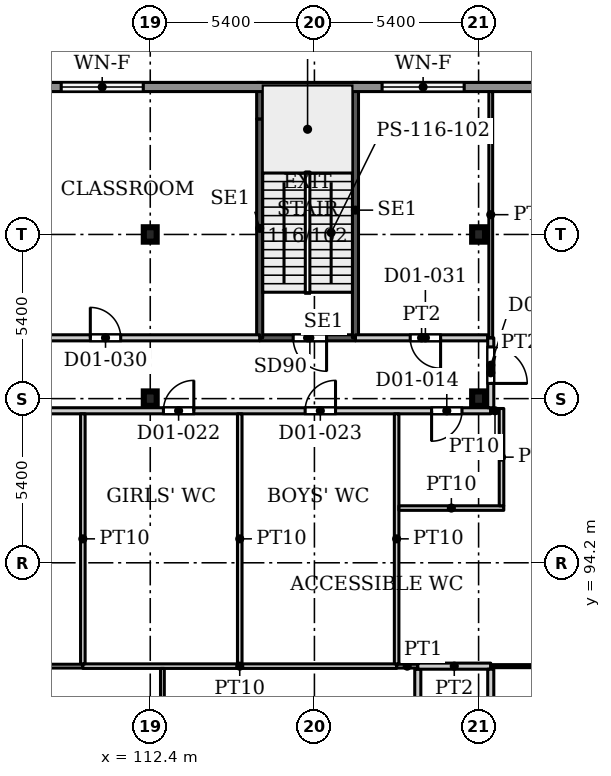
"""IFC4 building model, lengths in metres.
Left out: names, types, materials, properties, quantities, classifications, styles, units other than length and angle.
Written with IfcOpenShell. Run it as: python <this file> out.ifc"""

import sys

from ifc_helpers import new_model, si_unit, direction, frame, frame_2d, origin, origin_2d, place, context, subcontext, project, spatial, rectangle, i_section, extrude, source, transform, mapped, element, fill, save


model = new_model("IFC4")
c1 = context("Model", 3, precision=1e-05, world=origin(), true_north=direction((0.0, 1.0)))
c2 = subcontext(c1, "Body", "Model", "MODEL_VIEW")
j1 = project(units=[si_unit("LENGTHUNIT", "METRE"), si_unit("PLANEANGLEUNIT", "RADIAN")], contexts=[c1])
p1 = place(None, origin())
s1 = spatial("IfcSite", under=j1, at=p1, CompositionType="ELEMENT")
p2 = place(p1, origin())
s2 = spatial("IfcBuilding", under=s1, at=p2, CompositionType="ELEMENT")
p3 = place(p2, frame((0.0, 0.0, 7.5)))
s3 = spatial("IfcBuildingStorey", under=s2, at=p3, CompositionType="ELEMENT", Elevation=7.5)
for number, where, z_axis, x_axis in (
    (1, (112.4, 99.6, 0.0), (0.0, 0.0, 1.0), (1.0, 0.0, 0.0)),
    (2, (123.2, 99.6, 0.0), (0.0, 0.0, 1.0), (1.0, 0.0, 0.0)),
    (3, (112.4, 105.0, 0.0), (0.0, 0.0, 1.0), (1.0, 0.0, 0.0)),
    (4, (123.2, 105.0, 0.0), (0.0, 0.0, 1.0), (1.0, 0.0, 0.0)),
):
    element("IfcColumn", number, at=place(p3, frame(where, z_axis=z_axis, x_axis=x_axis)), inside=s3, PredefinedType="COLUMN", context=c2, shape_type="SweptSolid", body=[
        extrude(i_section(OverallWidth=0.424, OverallDepth=0.474, WebThickness=0.048, FlangeThickness=0.077, FilletRadius=0.014, at=origin_2d()), origin(), (0.0, 0.0, 1.0), 5.0),
    ])
p4 = place(p3, frame((78.48, 109.85, 0.0), z_axis=(0.0, 0.0, 1.0), x_axis=(1.0, 0.0, 0.0)))
e5 = element("IfcWall", 5, at=p4, inside=s3, PredefinedType="SOLIDWALL", context=c2, shape_type="SweptSolid", body=[
    extrude(rectangle(XDim=47.52, YDim=0.3, at=frame_2d((23.76, 0.0))), origin(), (0.0, 0.0, 1.0), 4.75),
])
p5 = place(p4, frame((1.045, 0.0, 0.6)))
e6 = element("IfcOpeningElement", 6, at=p5, cuts=e5, PredefinedType="OPENING", context=c2, shape_type="SweptSolid", body=[
    extrude(rectangle(XDim=2.7, YDim=3.0, at=frame_2d((1.35, 1.5))), frame((0.0, 0.16, 0.0), z_axis=(0.0, -1.0, 0.0), x_axis=(1.0, 0.0, 0.0)), (0.0, 0.0, 1.0), 0.32),
])
p6 = place(p4, frame((6.28, 0.0, 0.6)))
e7 = element("IfcOpeningElement", 7, at=p6, cuts=e5, PredefinedType="OPENING", context=c2, shape_type="SweptSolid", body=[
    extrude(rectangle(XDim=2.7, YDim=3.0, at=frame_2d((1.35, 1.5))), frame((0.0, 0.16, 0.0), z_axis=(0.0, -1.0, 0.0), x_axis=(1.0, 0.0, 0.0)), (0.0, 0.0, 1.0), 0.32),
])
p7 = place(p4, frame((15.765, 0.0, 0.6)))
e8 = element("IfcOpeningElement", 8, at=p7, cuts=e5, PredefinedType="OPENING", context=c2, shape_type="SweptSolid", body=[
    extrude(rectangle(XDim=2.7, YDim=3.0, at=frame_2d((1.35, 1.5))), frame((0.0, 0.16, 0.0), z_axis=(0.0, -1.0, 0.0), x_axis=(1.0, 0.0, 0.0)), (0.0, 0.0, 1.0), 0.32),
])
p8 = place(p4, frame((22.47, 0.0, 0.6)))
e9 = element("IfcOpeningElement", 9, at=p8, cuts=e5, PredefinedType="OPENING", context=c2, shape_type="SweptSolid", body=[
    extrude(rectangle(XDim=2.7, YDim=3.0, at=frame_2d((1.35, 1.5))), frame((0.0, 0.16, 0.0), z_axis=(0.0, -1.0, 0.0), x_axis=(1.0, 0.0, 0.0)), (0.0, 0.0, 1.0), 0.32),
])
p9 = place(p4, frame((30.99, 0.0, 0.6)))
e10 = element("IfcOpeningElement", 10, at=p9, cuts=e5, PredefinedType="OPENING", context=c2, shape_type="SweptSolid", body=[
    extrude(rectangle(XDim=2.7, YDim=3.0, at=frame_2d((1.35, 1.5))), frame((0.0, 0.16, 0.0), z_axis=(0.0, -1.0, 0.0), x_axis=(1.0, 0.0, 0.0)), (0.0, 0.0, 1.0), 0.32),
])
p10 = place(p4, frame((41.545, 0.0, 0.6)))
e11 = element("IfcOpeningElement", 11, at=p10, cuts=e5, PredefinedType="OPENING", context=c2, shape_type="SweptSolid", body=[
    extrude(rectangle(XDim=2.7, YDim=3.0, at=frame_2d((1.35, 1.5))), frame((0.0, 0.16, 0.0), z_axis=(0.0, -1.0, 0.0), x_axis=(1.0, 0.0, 0.0)), (0.0, 0.0, 1.0), 0.32),
])
p11 = place(p3, frame((116.0, 101.6, 0.0), z_axis=(0.0, 0.0, 1.0), x_axis=(1.0, 0.0, 0.0)))
e12 = element("IfcWall", 12, at=p11, inside=s3, PredefinedType="SHEAR", context=c2, shape_type="SweptSolid", body=[
    extrude(rectangle(XDim=3.15, YDim=0.2, at=frame_2d((1.575, 0.0))), origin(), (0.0, 0.0, 1.0), 5.0),
])
p12 = place(p11, frame((1.1, 0.0, 0.0)))
e13 = element("IfcOpeningElement", 13, at=p12, cuts=e12, PredefinedType="OPENING", context=c2, shape_type="SweptSolid", body=[
    extrude(rectangle(XDim=1.1, YDim=2.2, at=frame_2d((0.55, 1.1))), frame((0.0, 0.11, 0.0), z_axis=(0.0, -1.0, 0.0), x_axis=(1.0, 0.0, 0.0)), (0.0, 0.0, 1.0), 0.22),
])
p13 = place(p3, frame((116.0, 101.6, 0.0), z_axis=(0.0, 0.0, 1.0), x_axis=(0.0, 1.0, 0.0)))
e14 = element("IfcWall", 14, at=p13, inside=s3, PredefinedType="SHEAR", context=c2, shape_type="SweptSolid", body=[
    extrude(rectangle(XDim=7.2, YDim=0.2, at=frame_2d((3.6, 0.0))), origin(), (0.0, 0.0, 1.0), 5.0),
])
p14 = place(p3, frame((116.0, 108.8, 0.0), z_axis=(0.0, 0.0, 1.0), x_axis=(0.0, 1.0, 0.0)))
e15 = element("IfcWall", 15, at=p14, inside=s3, PredefinedType="SHEAR", context=c2, shape_type="SweptSolid", body=[
    extrude(rectangle(XDim=1.2, YDim=0.2, at=frame_2d((0.6, 0.0))), origin(), (0.0, 0.0, 1.0), 5.0),
])
p15 = place(p3, frame((119.15, 101.6, 0.0), z_axis=(0.0, 0.0, 1.0), x_axis=(0.0, 1.0, 0.0)))
e16 = element("IfcWall", 16, at=p15, inside=s3, PredefinedType="SHEAR", context=c2, shape_type="SweptSolid", body=[
    extrude(rectangle(XDim=8.4, YDim=0.2, at=frame_2d((4.2, 0.0))), origin(), (0.0, 0.0, 1.0), 5.0),
])
p16 = place(p3, frame((56.1, 99.2, 0.0), z_axis=(0.0, 0.0, 1.0), x_axis=(1.0, 0.0, 0.0)))
e17 = element("IfcWall", 17, at=p16, inside=s3, PredefinedType="PARTITIONING", context=c2, shape_type="SweptSolid", body=[
    extrude(rectangle(XDim=67.5, YDim=0.2, at=frame_2d((33.75, 0.0))), origin(), (0.0, 0.0, 1.0), 4.68),
])
p17 = place(p16, frame((4.05, 0.0, 0.0)))
e18 = element("IfcOpeningElement", 18, at=p17, cuts=e17, PredefinedType="OPENING", context=c2, shape_type="SweptSolid", body=[
    extrude(rectangle(XDim=1.0, YDim=2.1, at=frame_2d((0.5, 1.05))), frame((0.0, 0.11, 0.0), z_axis=(0.0, -1.0, 0.0), x_axis=(1.0, 0.0, 0.0)), (0.0, 0.0, 1.0), 0.22),
])
p18 = place(p16, frame((65.554, 0.0, 0.0)))
e19 = element("IfcOpeningElement", 19, at=p18, cuts=e17, PredefinedType="OPENING", context=c2, shape_type="SweptSolid", body=[
    extrude(rectangle(XDim=1.0, YDim=2.1, at=frame_2d((0.5, 1.05))), frame((0.0, 0.11, 0.0), z_axis=(0.0, -1.0, 0.0), x_axis=(1.0, 0.0, 0.0)), (0.0, 0.0, 1.0), 0.22),
])
p19 = place(p16, frame((11.589, 0.0, 0.0)))
e20 = element("IfcOpeningElement", 20, at=p19, cuts=e17, PredefinedType="OPENING", context=c2, shape_type="SweptSolid", body=[
    extrude(rectangle(XDim=1.0, YDim=2.1, at=frame_2d((0.5, 1.05))), frame((0.0, 0.11, 0.0), z_axis=(0.0, -1.0, 0.0), x_axis=(1.0, 0.0, 0.0)), (0.0, 0.0, 1.0), 0.22),
])
p20 = place(p16, frame((20.329, 0.0, 0.0)))
e21 = element("IfcOpeningElement", 21, at=p20, cuts=e17, PredefinedType="OPENING", context=c2, shape_type="SweptSolid", body=[
    extrude(rectangle(XDim=1.0, YDim=2.1, at=frame_2d((0.5, 1.05))), frame((0.0, 0.11, 0.0), z_axis=(0.0, -1.0, 0.0), x_axis=(1.0, 0.0, 0.0)), (0.0, 0.0, 1.0), 0.22),
])
p21 = place(p16, frame((27.319, 0.0, 0.0)))
e22 = element("IfcOpeningElement", 22, at=p21, cuts=e17, PredefinedType="OPENING", context=c2, shape_type="SweptSolid", body=[
    extrude(rectangle(XDim=1.0, YDim=2.1, at=frame_2d((0.5, 1.05))), frame((0.0, 0.11, 0.0), z_axis=(0.0, -1.0, 0.0), x_axis=(1.0, 0.0, 0.0)), (0.0, 0.0, 1.0), 0.22),
])
p22 = place(p16, frame((33.262, 0.0, 0.0)))
e23 = element("IfcOpeningElement", 23, at=p22, cuts=e17, PredefinedType="OPENING", context=c2, shape_type="SweptSolid", body=[
    extrude(rectangle(XDim=1.0, YDim=2.1, at=frame_2d((0.5, 1.05))), frame((0.0, 0.11, 0.0), z_axis=(0.0, -1.0, 0.0), x_axis=(1.0, 0.0, 0.0)), (0.0, 0.0, 1.0), 0.22),
])
p23 = place(p16, frame((42.002, 0.0, 0.0)))
e24 = element("IfcOpeningElement", 24, at=p23, cuts=e17, PredefinedType="OPENING", context=c2, shape_type="SweptSolid", body=[
    extrude(rectangle(XDim=1.0, YDim=2.1, at=frame_2d((0.5, 1.05))), frame((0.0, 0.11, 0.0), z_axis=(0.0, -1.0, 0.0), x_axis=(1.0, 0.0, 0.0)), (0.0, 0.0, 1.0), 0.22),
])
p24 = place(p16, frame((49.743, 0.0, 0.0)))
e25 = element("IfcOpeningElement", 25, at=p24, cuts=e17, PredefinedType="OPENING", context=c2, shape_type="SweptSolid", body=[
    extrude(rectangle(XDim=1.0, YDim=2.1, at=frame_2d((0.5, 1.05))), frame((0.0, 0.11, 0.0), z_axis=(0.0, -1.0, 0.0), x_axis=(1.0, 0.0, 0.0)), (0.0, 0.0, 1.0), 0.22),
])
p25 = place(p16, frame((56.733, 0.0, 0.0)))
e26 = element("IfcOpeningElement", 26, at=p25, cuts=e17, PredefinedType="OPENING", context=c2, shape_type="SweptSolid", body=[
    extrude(rectangle(XDim=1.0, YDim=2.1, at=frame_2d((0.5, 1.05))), frame((0.0, 0.11, 0.0), z_axis=(0.0, -1.0, 0.0), x_axis=(1.0, 0.0, 0.0)), (0.0, 0.0, 1.0), 0.22),
])
p26 = place(p16, frame((61.394, 0.0, 0.0)))
e27 = element("IfcOpeningElement", 27, at=p26, cuts=e17, PredefinedType="OPENING", context=c2, shape_type="SweptSolid", body=[
    extrude(rectangle(XDim=1.0, YDim=2.1, at=frame_2d((0.5, 1.05))), frame((0.0, 0.11, 0.0), z_axis=(0.0, -1.0, 0.0), x_axis=(1.0, 0.0, 0.0)), (0.0, 0.0, 1.0), 0.22),
])
p27 = place(p3, frame((82.0, 90.8, 0.0), z_axis=(0.0, 0.0, 1.0), x_axis=(1.0, 0.0, 0.0)))
e28 = element("IfcWall", 28, at=p27, inside=s3, PredefinedType="PARTITIONING", context=c2, shape_type="SweptSolid", body=[
    extrude(rectangle(XDim=28.183, YDim=0.125, at=frame_2d((14.092, 0.0))), origin(), (0.0, 0.0, 1.0), 4.68),
])
p28 = place(p3, frame((93.15, 101.6, 0.0), z_axis=(0.0, 0.0, 1.0), x_axis=(1.0, 0.0, 0.0)))
e29 = element("IfcWall", 29, at=p28, inside=s3, PredefinedType="PARTITIONING", context=c2, shape_type="SweptSolid", body=[
    extrude(rectangle(XDim=22.85, YDim=0.2, at=frame_2d((11.425, 0.0))), origin(), (0.0, 0.0, 1.0), 4.68),
])
p29 = place(p28, frame((1.987, 0.0, 0.0)))
e30 = element("IfcOpeningElement", 30, at=p29, cuts=e29, PredefinedType="OPENING", context=c2, shape_type="SweptSolid", body=[
    extrude(rectangle(XDim=1.0, YDim=2.1, at=frame_2d((0.5, 1.05))), frame((0.0, 0.11, 0.0), z_axis=(0.0, -1.0, 0.0), x_axis=(1.0, 0.0, 0.0)), (0.0, 0.0, 1.0), 0.22),
])
p30 = place(p28, frame((8.758, 0.0, 0.0)))
e31 = element("IfcOpeningElement", 31, at=p30, cuts=e29, PredefinedType="OPENING", context=c2, shape_type="SweptSolid", body=[
    extrude(rectangle(XDim=1.0, YDim=2.1, at=frame_2d((0.5, 1.05))), frame((0.0, 0.11, 0.0), z_axis=(0.0, -1.0, 0.0), x_axis=(1.0, 0.0, 0.0)), (0.0, 0.0, 1.0), 0.22),
])
p31 = place(p28, frame((17.279, 0.0, 0.0)))
e32 = element("IfcOpeningElement", 32, at=p31, cuts=e29, PredefinedType="OPENING", context=c2, shape_type="SweptSolid", body=[
    extrude(rectangle(XDim=1.0, YDim=2.1, at=frame_2d((0.5, 1.05))), frame((0.0, 0.11, 0.0), z_axis=(0.0, -1.0, 0.0), x_axis=(1.0, 0.0, 0.0)), (0.0, 0.0, 1.0), 0.22),
])
p32 = place(p3, frame((110.183, 90.8, 0.0), z_axis=(0.0, 0.0, 1.0), x_axis=(1.0, 0.0, 0.0)))
e33 = element("IfcWall", 33, at=p32, inside=s3, PredefinedType="PARTITIONING", context=c2, shape_type="SweptSolid", body=[
    extrude(rectangle(XDim=10.321, YDim=0.15, at=frame_2d((5.16, 0.0))), origin(), (0.0, 0.0, 1.0), 4.68),
])
p33 = place(p3, frame((110.183, 90.875, 0.0), z_axis=(0.0, 0.0, 1.0), x_axis=(0.0, 1.0, 0.0)))
e34 = element("IfcWall", 34, at=p33, inside=s3, PredefinedType="PARTITIONING", context=c2, shape_type="SweptSolid", body=[
    extrude(rectangle(XDim=8.225, YDim=0.15, at=frame_2d((4.113, 0.0))), origin(), (0.0, 0.0, 1.0), 4.68),
])
p34 = place(p3, frame((112.8, 43.938, 0.0), z_axis=(0.0, 0.0, 1.0), x_axis=(0.0, 1.0, 0.0)))
e35 = element("IfcWall", 35, at=p34, inside=s3, PredefinedType="PARTITIONING", context=c2, shape_type="SweptSolid", body=[
    extrude(rectangle(XDim=46.787, YDim=0.125, at=frame_2d((23.394, 0.0))), origin(), (0.0, 0.0, 1.0), 4.68),
])
p35 = place(p3, frame((115.344, 90.875, 0.0), z_axis=(0.0, 0.0, 1.0), x_axis=(0.0, 1.0, 0.0)))
e36 = element("IfcWall", 36, at=p35, inside=s3, PredefinedType="PARTITIONING", context=c2, shape_type="SweptSolid", body=[
    extrude(rectangle(XDim=8.225, YDim=0.15, at=frame_2d((4.113, 0.0))), origin(), (0.0, 0.0, 1.0), 4.68),
])
p36 = place(p3, frame((119.15, 101.6, 0.0), z_axis=(0.0, 0.0, 1.0), x_axis=(1.0, 0.0, 0.0)))
e37 = element("IfcWall", 37, at=p36, inside=s3, PredefinedType="PARTITIONING", context=c2, shape_type="SweptSolid", body=[
    extrude(rectangle(XDim=4.35, YDim=0.2, at=frame_2d((2.175, 0.0))), origin(), (0.0, 0.0, 1.0), 4.68),
])
p37 = place(p36, frame((1.8, 0.0, 0.0)))
e38 = element("IfcOpeningElement", 38, at=p37, cuts=e37, PredefinedType="OPENING", context=c2, shape_type="SweptSolid", body=[
    extrude(rectangle(XDim=1.0, YDim=2.1, at=frame_2d((0.5, 1.05))), frame((0.0, 0.11, 0.0), z_axis=(0.0, -1.0, 0.0), x_axis=(1.0, 0.0, 0.0)), (0.0, 0.0, 1.0), 0.22),
])
p38 = place(p3, frame((120.504, 90.8, 0.0), z_axis=(0.0, 0.0, 1.0), x_axis=(1.0, 0.0, 0.0)))
e39 = element("IfcWall", 39, at=p38, inside=s3, PredefinedType="PARTITIONING", context=c2, shape_type="SweptSolid", body=[
    extrude(rectangle(XDim=0.696, YDim=0.125, at=frame_2d((0.348, 0.0))), origin(), (0.0, 0.0, 1.0), 4.68),
])
p39 = place(p3, frame((120.504, 90.875, 0.0), z_axis=(0.0, 0.0, 1.0), x_axis=(0.0, 1.0, 0.0)))
e40 = element("IfcWall", 40, at=p39, inside=s3, PredefinedType="PARTITIONING", context=c2, shape_type="SweptSolid", body=[
    extrude(rectangle(XDim=8.225, YDim=0.15, at=frame_2d((4.113, 0.0))), origin(), (0.0, 0.0, 1.0), 4.68),
])
p40 = place(p3, frame((120.579, 96.0, 0.0), z_axis=(0.0, 0.0, 1.0), x_axis=(1.0, 0.0, 0.0)))
e41 = element("IfcWall", 41, at=p40, inside=s3, PredefinedType="PARTITIONING", context=c2, shape_type="SweptSolid", body=[
    extrude(rectangle(XDim=3.45, YDim=0.15, at=frame_2d((1.725, 0.0))), origin(), (0.0, 0.0, 1.0), 4.68),
])
p41 = place(p3, frame((121.2, 74.6, 0.0), z_axis=(0.0, 0.0, 1.0), x_axis=(0.0, 1.0, 0.0)))
e42 = element("IfcWall", 42, at=p41, inside=s3, PredefinedType="PARTITIONING", context=c2, shape_type="SweptSolid", body=[
    extrude(rectangle(XDim=16.1, YDim=0.2, at=frame_2d((8.05, 0.0))), origin(), (0.0, 0.0, 1.0), 4.68),
])
p42 = place(p41, frame((3.987, 0.0, 0.0)))
e43 = element("IfcOpeningElement", 43, at=p42, cuts=e42, PredefinedType="OPENING", context=c2, shape_type="SweptSolid", body=[
    extrude(rectangle(XDim=1.0, YDim=2.1, at=frame_2d((0.5, 1.05))), frame((0.0, 0.11, 0.0), z_axis=(0.0, -1.0, 0.0), x_axis=(1.0, 0.0, 0.0)), (0.0, 0.0, 1.0), 0.22),
])
p43 = place(p41, frame((12.05, 0.0, 0.0)))
e44 = element("IfcOpeningElement", 44, at=p43, cuts=e42, PredefinedType="OPENING", context=c2, shape_type="SweptSolid", body=[
    extrude(rectangle(XDim=1.0, YDim=2.1, at=frame_2d((0.5, 1.05))), frame((0.0, 0.11, 0.0), z_axis=(0.0, -1.0, 0.0), x_axis=(1.0, 0.0, 0.0)), (0.0, 0.0, 1.0), 0.22),
])
p44 = place(p3, frame((121.2, 90.8, 0.0), z_axis=(0.0, 0.0, 1.0), x_axis=(1.0, 0.0, 0.0)))
e45 = element("IfcWall", 45, at=p44, inside=s3, PredefinedType="PARTITIONING", context=c2, shape_type="SweptSolid", body=[
    extrude(rectangle(XDim=2.4, YDim=0.2, at=frame_2d((1.2, 0.0))), origin(), (0.0, 0.0, 1.0), 4.68),
])
p45 = place(p3, frame((123.6, 69.15, 0.0), z_axis=(0.0, 0.0, 1.0), x_axis=(0.0, 1.0, 0.0)))
e46 = element("IfcWall", 46, at=p45, inside=s3, PredefinedType="PARTITIONING", context=c2, shape_type="SweptSolid", body=[
    extrude(rectangle(XDim=21.55, YDim=0.2, at=frame_2d((10.775, 0.0))), origin(), (0.0, 0.0, 1.0), 4.68),
])
p46 = place(p45, frame((4.4, 0.0, 0.0)))
e47 = element("IfcOpeningElement", 47, at=p46, cuts=e46, PredefinedType="OPENING", context=c2, shape_type="SweptSolid", body=[
    extrude(rectangle(XDim=1.0, YDim=2.1, at=frame_2d((0.5, 1.05))), frame((0.0, 0.11, 0.0), z_axis=(0.0, -1.0, 0.0), x_axis=(1.0, 0.0, 0.0)), (0.0, 0.0, 1.0), 0.22),
])
p47 = place(p45, frame((15.238, 0.0, 0.0)))
e48 = element("IfcOpeningElement", 48, at=p47, cuts=e46, PredefinedType="OPENING", context=c2, shape_type="SweptSolid", body=[
    extrude(rectangle(XDim=1.0, YDim=2.1, at=frame_2d((0.5, 1.05))), frame((0.0, 0.11, 0.0), z_axis=(0.0, -1.0, 0.0), x_axis=(1.0, 0.0, 0.0)), (0.0, 0.0, 1.0), 0.22),
])
p48 = place(p45, frame((11.238, 0.0, 0.0)))
e49 = element("IfcOpeningElement", 49, at=p48, cuts=e46, PredefinedType="OPENING", context=c2, shape_type="SweptSolid", body=[
    extrude(rectangle(XDim=1.2, YDim=2.1, at=frame_2d((0.6, 1.05))), frame((0.0, 0.11, 0.0), z_axis=(0.0, -1.0, 0.0), x_axis=(1.0, 0.0, 0.0)), (0.0, 0.0, 1.0), 0.22),
])
p49 = place(p3, frame((123.6, 90.8, 0.0), z_axis=(0.0, 0.0, 1.0), x_axis=(1.0, 0.0, 0.0)))
e50 = element("IfcWall", 50, at=p49, inside=s3, PredefinedType="PARTITIONING", context=c2, shape_type="SweptSolid", body=[
    extrude(rectangle(XDim=8.4, YDim=0.1, at=frame_2d((4.2, 0.0))), origin(), (0.0, 0.0, 1.0), 4.68),
])
p50 = place(p3, frame((123.6, 99.2, 0.0), z_axis=(0.0, 0.0, 1.0), x_axis=(1.0, 0.0, 0.0)))
e51 = element("IfcWall", 51, at=p50, inside=s3, PredefinedType="PARTITIONING", context=c2, shape_type="SweptSolid", body=[
    extrude(rectangle(XDim=0.279, YDim=0.15, at=frame_2d((0.139, 0.0))), origin(), (0.0, 0.0, 1.0), 4.68),
])
p51 = place(p3, frame((123.6, 99.3, 0.0), z_axis=(0.0, 0.0, 1.0), x_axis=(0.0, 1.0, 0.0)))
e52 = element("IfcWall", 52, at=p51, inside=s3, PredefinedType="PARTITIONING", context=c2, shape_type="SweptSolid", body=[
    extrude(rectangle(XDim=2.3, YDim=0.2, at=frame_2d((1.15, 0.0))), origin(), (0.0, 0.0, 1.0), 4.68),
])
p52 = place(p51, frame((0.8, 0.0, 0.0)))
e53 = element("IfcOpeningElement", 53, at=p52, cuts=e52, PredefinedType="OPENING", context=c2, shape_type="SweptSolid", body=[
    extrude(rectangle(XDim=1.2, YDim=2.1, at=frame_2d((0.6, 1.05))), frame((0.0, 0.11, 0.0), z_axis=(0.0, -1.0, 0.0), x_axis=(1.0, 0.0, 0.0)), (0.0, 0.0, 1.0), 0.22),
])
p53 = place(p3, frame((123.6, 101.6, 0.0), z_axis=(0.0, 0.0, 1.0), x_axis=(0.0, 1.0, 0.0)))
e54 = element("IfcWall", 54, at=p53, inside=s3, PredefinedType="PARTITIONING", context=c2, shape_type="SweptSolid", body=[
    extrude(rectangle(XDim=8.101, YDim=0.125, at=frame_2d((4.05, 0.0))), origin(), (0.0, 0.0, 1.0), 4.68),
])
p54 = place(p3, frame((123.954, 96.075, 0.0), z_axis=(0.0, 0.0, 1.0), x_axis=(0.0, 1.0, 0.0)))
e55 = element("IfcWall", 55, at=p54, inside=s3, PredefinedType="PARTITIONING", context=c2, shape_type="SweptSolid", body=[
    extrude(rectangle(XDim=3.2, YDim=0.15, at=frame_2d((1.6, 0.0))), origin(), (0.0, 0.0, 1.0), 4.68),
])
m1 = source(origin(), c2, "Body", "SweptSolid", [
    extrude(rectangle(XDim=2.7, YDim=3.0, at=frame_2d((1.35, 1.5))), frame((0.0, 0.03, 0.0), z_axis=(0.0, -1.0, 0.0), x_axis=(1.0, 0.0, 0.0)), (0.0, 0.0, 1.0), 0.06),
])
p55 = place(p9, origin())
e56 = element("IfcWindow", 56, at=p55, inside=s3, PartitioningType="SINGLE_PANEL", PredefinedType="WINDOW", context=c2, shape_type="MappedRepresentation", body=[
    mapped(m1, transform((0.0, 0.0, 0.0), x_axis=(1.0, 0.0, 0.0), y_axis=(0.0, 1.0, 0.0), z_axis=(0.0, 0.0, 1.0), scale=1.0)),
])
fill(e10, e56)
p56 = place(p10, origin())
e57 = element("IfcWindow", 57, at=p56, inside=s3, PartitioningType="SINGLE_PANEL", PredefinedType="WINDOW", context=c2, shape_type="MappedRepresentation", body=[
    mapped(m1, transform((0.0, 0.0, 0.0), x_axis=(1.0, 0.0, 0.0), y_axis=(0.0, 1.0, 0.0), z_axis=(0.0, 0.0, 1.0), scale=1.0)),
])
fill(e11, e57)
m2 = source(origin(), c2, "Body", "SweptSolid", [
    extrude(rectangle(XDim=1.1, YDim=2.2, at=frame_2d((0.55, 1.1))), frame((0.0, 0.025, 0.0), z_axis=(0.0, -1.0, 0.0), x_axis=(1.0, 0.0, 0.0)), (0.0, 0.0, 1.0), 0.05),
])
p57 = place(p12, origin())
e58 = element("IfcDoor", 58, at=p57, inside=s3, OperationType="SINGLE_SWING_RIGHT", PredefinedType="DOOR", context=c2, shape_type="MappedRepresentation", body=[
    mapped(m2, transform((0.0, 0.0, 0.0), x_axis=(1.0, 0.0, 0.0), y_axis=(0.0, 1.0, 0.0), z_axis=(0.0, 0.0, 1.0), scale=1.0)),
])
fill(e13, e58)
m3 = source(origin(), c2, "Body", "SweptSolid", [
    extrude(rectangle(XDim=1.0, YDim=2.1, at=frame_2d((0.5, 1.05))), frame((0.0, 0.025, 0.0), z_axis=(0.0, -1.0, 0.0), x_axis=(1.0, 0.0, 0.0)), (0.0, 0.0, 1.0), 0.05),
])
p58 = place(p18, origin())
e59 = element("IfcDoor", 59, at=p58, inside=s3, OperationType="SINGLE_SWING_RIGHT", PredefinedType="DOOR", context=c2, shape_type="MappedRepresentation", body=[
    mapped(m3, transform((0.0, 0.0, 0.0), x_axis=(1.0, 0.0, 0.0), y_axis=(0.0, 1.0, 0.0), z_axis=(0.0, 0.0, 1.0), scale=1.0)),
])
fill(e19, e59)
m4 = source(origin(), c2, "Body", "SweptSolid", [
    extrude(rectangle(XDim=1.2, YDim=2.1, at=frame_2d((0.6, 1.05))), frame((0.0, 0.025, 0.0), z_axis=(0.0, -1.0, 0.0), x_axis=(1.0, 0.0, 0.0)), (0.0, 0.0, 1.0), 0.05),
])
p59 = place(p52, origin())
e60 = element("IfcDoor", 60, at=p59, inside=s3, OperationType="SINGLE_SWING_RIGHT", PredefinedType="DOOR", context=c2, shape_type="MappedRepresentation", body=[
    mapped(m4, transform((0.0, 0.0, 0.0), x_axis=(1.0, 0.0, 0.0), y_axis=(0.0, 1.0, 0.0), z_axis=(0.0, 0.0, 1.0), scale=1.0)),
])
fill(e53, e60)
p60 = place(p25, origin())
e61 = element("IfcDoor", 61, at=p60, inside=s3, OperationType="SINGLE_SWING_LEFT", PredefinedType="DOOR", context=c2, shape_type="MappedRepresentation", body=[
    mapped(m3, transform((0.0, 0.0, 0.0), x_axis=(1.0, 0.0, 0.0), y_axis=(0.0, 1.0, 0.0), z_axis=(0.0, 0.0, 1.0), scale=1.0)),
])
fill(e26, e61)
p61 = place(p26, origin())
e62 = element("IfcDoor", 62, at=p61, inside=s3, OperationType="SINGLE_SWING_LEFT", PredefinedType="DOOR", context=c2, shape_type="MappedRepresentation", body=[
    mapped(m3, transform((0.0, 0.0, 0.0), x_axis=(1.0, 0.0, 0.0), y_axis=(0.0, 1.0, 0.0), z_axis=(0.0, 0.0, 1.0), scale=1.0)),
])
fill(e27, e62)
p62 = place(p31, origin())
e63 = element("IfcDoor", 63, at=p62, inside=s3, OperationType="SINGLE_SWING_LEFT", PredefinedType="DOOR", context=c2, shape_type="MappedRepresentation", body=[
    mapped(m3, transform((0.0, 0.0, 0.0), x_axis=(1.0, 0.0, 0.0), y_axis=(0.0, 1.0, 0.0), z_axis=(0.0, 0.0, 1.0), scale=1.0)),
])
fill(e32, e63)
p63 = place(p37, origin())
e64 = element("IfcDoor", 64, at=p63, inside=s3, OperationType="SINGLE_SWING_RIGHT", PredefinedType="DOOR", context=c2, shape_type="MappedRepresentation", body=[
    mapped(m3, transform((0.0, 0.0, 0.0), x_axis=(1.0, 0.0, 0.0), y_axis=(0.0, 1.0, 0.0), z_axis=(0.0, 0.0, 1.0), scale=1.0)),
])
fill(e38, e64)
save(model, sys.argv[1])
